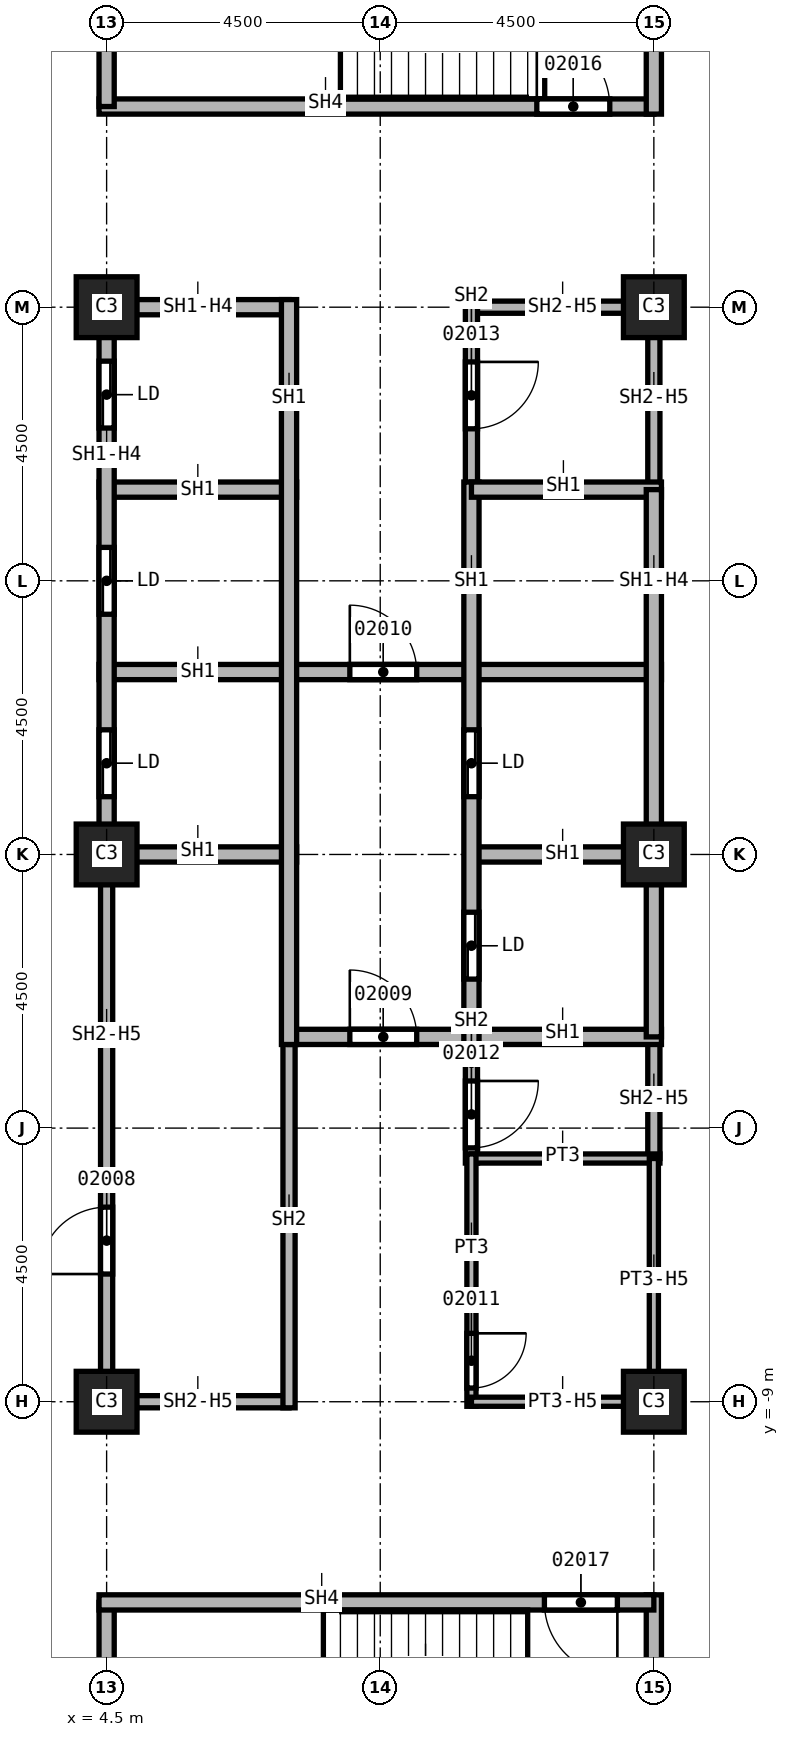
"""IFC4 building model, lengths in metres.
Left out: names, types, materials, properties, quantities, classifications, styles, units other than length and angle.
Written with IfcOpenShell. Run it as: python <this file> out.ifc"""

import sys

from ifc_helpers import new_model, si_unit, direction, frame, frame_2d, origin, origin_2d, place, context, subcontext, project, spatial, rectangle, extrude, element, fill, save


model = new_model("IFC4")
c1 = context("Model", 3, precision=1e-05, world=origin(), true_north=direction((0.0, 1.0)))
c2 = subcontext(c1, "Body", "Model", "MODEL_VIEW")
j1 = project(units=[si_unit("LENGTHUNIT", "METRE"), si_unit("PLANEANGLEUNIT", "RADIAN")], contexts=[c1])
p1 = place(None, origin())
s1 = spatial("IfcSite", under=j1, at=p1, CompositionType="ELEMENT")
p2 = place(p1, origin())
s2 = spatial("IfcBuilding", under=s1, at=p2, CompositionType="ELEMENT")
p3 = place(p2, frame((0.0, 0.0, 80.0)))
s3 = spatial("IfcBuildingStorey", under=s2, at=p3, CompositionType="ELEMENT", Elevation=80.0)
for number, where, z_axis, x_axis in (
    (1, (4.5, 0.0, 0.0), (0.0, 0.0, 1.0), (1.0, 0.0, 0.0)),
    (2, (4.5, 9.0, 0.0), (0.0, 0.0, 1.0), (1.0, 0.0, 0.0)),
    (3, (4.5, -9.0, 0.0), (0.0, 0.0, 1.0), (1.0, 0.0, 0.0)),
    (4, (13.5, 0.0, 0.0), (0.0, 0.0, 1.0), (1.0, 0.0, 0.0)),
    (5, (13.5, 9.0, 0.0), (0.0, 0.0, 1.0), (1.0, 0.0, 0.0)),
    (6, (13.5, -9.0, 0.0), (0.0, 0.0, 1.0), (1.0, 0.0, 0.0)),
):
    element("IfcColumn", number, at=place(p3, frame(where, z_axis=z_axis, x_axis=x_axis)), inside=s3, PredefinedType="COLUMN", context=c2, shape_type="SweptSolid", body=[
        extrude(rectangle(XDim=1.0, YDim=1.0, at=origin_2d()), origin(), (0.0, 0.0, 1.0), 3.7),
    ])
p4 = place(p3, frame((4.5, -9.1, 0.0), z_axis=(0.0, 0.0, 1.0), x_axis=(0.0, 1.0, 0.0)))
e7 = element("IfcWall", 7, at=p4, inside=s3, PredefinedType="SOLIDWALL", context=c2, shape_type="SweptSolid", body=[
    extrude(rectangle(XDim=9.1, YDim=0.2, at=frame_2d((4.55, 0.0))), origin(), (0.0, 0.0, 1.0), 2.938),
])
p5 = place(p4, frame((2.2, 0.0, 0.0)))
e8 = element("IfcOpeningElement", 8, at=p5, cuts=e7, PredefinedType="OPENING", context=c2, shape_type="SweptSolid", body=[
    extrude(rectangle(XDim=1.1, YDim=2.1, at=frame_2d((0.55, 1.05))), frame((0.0, 0.1, 0.0), z_axis=(0.0, -1.0, 0.0), x_axis=(1.0, 0.0, 0.0)), (0.0, 0.0, 1.0), 0.2),
])
p6 = place(p3, frame((7.5, -9.0, 0.0), z_axis=(0.0, 0.0, 1.0), x_axis=(-1.0, 0.0, 0.0)))
e9 = element("IfcWall", 9, at=p6, inside=s3, PredefinedType="SOLIDWALL", context=c2, shape_type="SweptSolid", body=[
    extrude(rectangle(XDim=3.0, YDim=0.2, at=frame_2d((1.5, 0.0))), origin(), (0.0, 0.0, 1.0), 2.938),
])
p7 = place(p3, frame((7.5, -2.875, 0.0), z_axis=(0.0, 0.0, 1.0), x_axis=(0.0, -1.0, 0.0)))
e10 = element("IfcWall", 10, at=p7, inside=s3, PredefinedType="SOLIDWALL", context=c2, shape_type="SweptSolid", body=[
    extrude(rectangle(XDim=6.225, YDim=0.2, at=frame_2d((3.113, 0.0))), origin(), (0.0, 0.0, 1.0), 3.7),
])
p8 = place(p3, frame((10.5, -2.875, 0.0), z_axis=(0.0, 0.0, 1.0), x_axis=(0.0, -1.0, 0.0)))
e11 = element("IfcWall", 11, at=p8, inside=s3, PredefinedType="SOLIDWALL", context=c2, shape_type="SweptSolid", body=[
    extrude(rectangle(XDim=2.2, YDim=0.2, at=frame_2d((1.1, 0.0))), origin(), (0.0, 0.0, 1.0), 3.7),
])
p9 = place(p8, frame((0.85, 0.0, 0.0)))
e12 = element("IfcOpeningElement", 12, at=p9, cuts=e11, PredefinedType="OPENING", context=c2, shape_type="SweptSolid", body=[
    extrude(rectangle(XDim=1.1, YDim=2.1, at=frame_2d((0.55, 1.05))), frame((0.0, 0.1, 0.0), z_axis=(0.0, -1.0, 0.0), x_axis=(1.0, 0.0, 0.0)), (0.0, 0.0, 1.0), 0.2),
])
p10 = place(p3, frame((10.5, 9.0, 0.0), z_axis=(0.0, 0.0, 1.0), x_axis=(1.0, 0.0, 0.0)))
e13 = element("IfcWall", 13, at=p10, inside=s3, PredefinedType="SOLIDWALL", context=c2, shape_type="SweptSolid", body=[
    extrude(rectangle(XDim=3.0, YDim=0.2, at=frame_2d((1.5, 0.0))), origin(), (0.0, 0.0, 1.0), 2.938),
])
p11 = place(p3, frame((10.5, 9.1, 0.0), z_axis=(0.0, 0.0, 1.0), x_axis=(0.0, -1.0, 0.0)))
e14 = element("IfcWall", 14, at=p11, inside=s3, PredefinedType="SOLIDWALL", context=c2, shape_type="SweptSolid", body=[
    extrude(rectangle(XDim=3.225, YDim=0.2, at=frame_2d((1.613, 0.0))), origin(), (0.0, 0.0, 1.0), 3.7),
])
p12 = place(p11, frame((1.0, 0.0, 0.0)))
e15 = element("IfcOpeningElement", 15, at=p12, cuts=e14, PredefinedType="OPENING", context=c2, shape_type="SweptSolid", body=[
    extrude(rectangle(XDim=1.1, YDim=2.1, at=frame_2d((0.55, 1.05))), frame((0.0, 0.1, 0.0), z_axis=(0.0, -1.0, 0.0), x_axis=(1.0, 0.0, 0.0)), (0.0, 0.0, 1.0), 0.2),
])
p13 = place(p3, frame((13.5, -3.0, 0.0), z_axis=(0.0, 0.0, 1.0), x_axis=(0.0, -1.0, 0.0)))
e16 = element("IfcWall", 16, at=p13, inside=s3, PredefinedType="SOLIDWALL", context=c2, shape_type="SweptSolid", body=[
    extrude(rectangle(XDim=2.0, YDim=0.2, at=frame_2d((1.0, 0.0))), origin(), (0.0, 0.0, 1.0), 2.938),
])
p14 = place(p3, frame((13.5, 9.1, 0.0), z_axis=(0.0, 0.0, 1.0), x_axis=(0.0, -1.0, 0.0)))
e17 = element("IfcWall", 17, at=p14, inside=s3, PredefinedType="SOLIDWALL", context=c2, shape_type="SweptSolid", body=[
    extrude(rectangle(XDim=3.1, YDim=0.2, at=frame_2d((1.55, 0.0))), origin(), (0.0, 0.0, 1.0), 2.938),
])
p15 = place(p3, frame((4.375, 0.0, 0.0), z_axis=(0.0, 0.0, 1.0), x_axis=(1.0, 0.0, 0.0)))
e18 = element("IfcWall", 18, at=p15, inside=s3, PredefinedType="SOLIDWALL", context=c2, shape_type="SweptSolid", body=[
    extrude(rectangle(XDim=3.25, YDim=0.25, at=frame_2d((1.625, 0.0))), origin(), (0.0, 0.0, 1.0), 3.7),
])
p16 = place(p3, frame((4.375, 3.0, 0.0), z_axis=(0.0, 0.0, 1.0), x_axis=(1.0, 0.0, 0.0)))
e19 = element("IfcWall", 19, at=p16, inside=s3, PredefinedType="SOLIDWALL", context=c2, shape_type="SweptSolid", body=[
    extrude(rectangle(XDim=9.25, YDim=0.25, at=frame_2d((4.625, 0.0))), origin(), (0.0, 0.0, 1.0), 3.7),
])
p17 = place(p16, frame((4.125, 0.0, 0.0)))
e20 = element("IfcOpeningElement", 20, at=p17, cuts=e19, PredefinedType="OPENING", context=c2, shape_type="SweptSolid", body=[
    extrude(rectangle(XDim=1.1, YDim=2.1, at=frame_2d((0.55, 1.05))), frame((0.0, 0.125, 0.0), z_axis=(0.0, -1.0, 0.0), x_axis=(1.0, 0.0, 0.0)), (0.0, 0.0, 1.0), 0.25),
])
p18 = place(p3, frame((4.375, 6.0, 0.0), z_axis=(0.0, 0.0, 1.0), x_axis=(1.0, 0.0, 0.0)))
e21 = element("IfcWall", 21, at=p18, inside=s3, PredefinedType="SOLIDWALL", context=c2, shape_type="SweptSolid", body=[
    extrude(rectangle(XDim=3.25, YDim=0.25, at=frame_2d((1.625, 0.0))), origin(), (0.0, 0.0, 1.0), 3.7),
])
p19 = place(p3, frame((4.5, 0.0, 0.0), z_axis=(0.0, 0.0, 1.0), x_axis=(0.0, 1.0, 0.0)))
e22 = element("IfcWall", 22, at=p19, inside=s3, PredefinedType="SOLIDWALL", context=c2, shape_type="SweptSolid", body=[
    extrude(rectangle(XDim=9.125, YDim=0.25, at=frame_2d((4.562, 0.0))), origin(), (0.0, 0.0, 1.0), 2.938),
])
p20 = place(p19, frame((0.95, 0.0, 0.0)))
e23 = element("IfcOpeningElement", 23, at=p20, cuts=e22, PredefinedType="OPENING", context=c2, shape_type="SweptSolid", body=[
    extrude(rectangle(XDim=1.1, YDim=2.1, at=frame_2d((0.55, 1.05))), frame((0.0, 0.125, 0.0), z_axis=(0.0, -1.0, 0.0), x_axis=(1.0, 0.0, 0.0)), (0.0, 0.0, 1.0), 0.25),
])
p21 = place(p19, frame((3.95, 0.0, 0.0)))
e24 = element("IfcOpeningElement", 24, at=p21, cuts=e22, PredefinedType="OPENING", context=c2, shape_type="SweptSolid", body=[
    extrude(rectangle(XDim=1.1, YDim=2.1, at=frame_2d((0.55, 1.05))), frame((0.0, 0.125, 0.0), z_axis=(0.0, -1.0, 0.0), x_axis=(1.0, 0.0, 0.0)), (0.0, 0.0, 1.0), 0.25),
])
p22 = place(p19, frame((7.012, 0.0, 0.0)))
e25 = element("IfcOpeningElement", 25, at=p22, cuts=e22, PredefinedType="OPENING", context=c2, shape_type="SweptSolid", body=[
    extrude(rectangle(XDim=1.1, YDim=2.1, at=frame_2d((0.55, 1.05))), frame((0.0, 0.125, 0.0), z_axis=(0.0, -1.0, 0.0), x_axis=(1.0, 0.0, 0.0)), (0.0, 0.0, 1.0), 0.25),
])
p23 = place(p3, frame((4.5, 9.0, 0.0), z_axis=(0.0, 0.0, 1.0), x_axis=(1.0, 0.0, 0.0)))
e26 = element("IfcWall", 26, at=p23, inside=s3, PredefinedType="SOLIDWALL", context=c2, shape_type="SweptSolid", body=[
    extrude(rectangle(XDim=3.0, YDim=0.25, at=frame_2d((1.5, 0.0))), origin(), (0.0, 0.0, 1.0), 2.938),
])
p24 = place(p3, frame((7.5, -3.0, 0.0), z_axis=(0.0, 0.0, 1.0), x_axis=(1.0, 0.0, 0.0)))
e27 = element("IfcWall", 27, at=p24, inside=s3, PredefinedType="SOLIDWALL", context=c2, shape_type="SweptSolid", body=[
    extrude(rectangle(XDim=6.125, YDim=0.25, at=frame_2d((3.062, 0.0))), origin(), (0.0, 0.0, 1.0), 3.7),
])
p25 = place(p24, frame((1.0, 0.0, 0.0)))
e28 = element("IfcOpeningElement", 28, at=p25, cuts=e27, PredefinedType="OPENING", context=c2, shape_type="SweptSolid", body=[
    extrude(rectangle(XDim=1.1, YDim=2.1, at=frame_2d((0.55, 1.05))), frame((0.0, 0.125, 0.0), z_axis=(0.0, -1.0, 0.0), x_axis=(1.0, 0.0, 0.0)), (0.0, 0.0, 1.0), 0.25),
])
p26 = place(p3, frame((7.5, 9.125, 0.0), z_axis=(0.0, 0.0, 1.0), x_axis=(0.0, -1.0, 0.0)))
e29 = element("IfcWall", 29, at=p26, inside=s3, PredefinedType="SOLIDWALL", context=c2, shape_type="SweptSolid", body=[
    extrude(rectangle(XDim=12.25, YDim=0.25, at=frame_2d((6.125, 0.0))), origin(), (0.0, 0.0, 1.0), 3.7),
])
p27 = place(p3, frame((10.5, 0.0, 0.0), z_axis=(0.0, 0.0, 1.0), x_axis=(1.0, 0.0, 0.0)))
e30 = element("IfcWall", 30, at=p27, inside=s3, PredefinedType="SOLIDWALL", context=c2, shape_type="SweptSolid", body=[
    extrude(rectangle(XDim=3.125, YDim=0.25, at=frame_2d((1.562, 0.0))), origin(), (0.0, 0.0, 1.0), 3.7),
])
p28 = place(p3, frame((10.5, 6.125, 0.0), z_axis=(0.0, 0.0, 1.0), x_axis=(0.0, -1.0, 0.0)))
e31 = element("IfcWall", 31, at=p28, inside=s3, PredefinedType="SOLIDWALL", context=c2, shape_type="SweptSolid", body=[
    extrude(rectangle(XDim=9.25, YDim=0.25, at=frame_2d((4.625, 0.0))), origin(), (0.0, 0.0, 1.0), 3.7),
])
p29 = place(p28, frame((7.075, 0.0, 0.0)))
e32 = element("IfcOpeningElement", 32, at=p29, cuts=e31, PredefinedType="OPENING", context=c2, shape_type="SweptSolid", body=[
    extrude(rectangle(XDim=1.1, YDim=2.1, at=frame_2d((0.55, 1.05))), frame((0.0, 0.125, 0.0), z_axis=(0.0, -1.0, 0.0), x_axis=(1.0, 0.0, 0.0)), (0.0, 0.0, 1.0), 0.25),
])
p30 = place(p28, frame((4.075, 0.0, 0.0)))
e33 = element("IfcOpeningElement", 33, at=p30, cuts=e31, PredefinedType="OPENING", context=c2, shape_type="SweptSolid", body=[
    extrude(rectangle(XDim=1.1, YDim=2.1, at=frame_2d((0.55, 1.05))), frame((0.0, 0.125, 0.0), z_axis=(0.0, -1.0, 0.0), x_axis=(1.0, 0.0, 0.0)), (0.0, 0.0, 1.0), 0.25),
])
p31 = place(p3, frame((10.5, 6.0, 0.0), z_axis=(0.0, 0.0, 1.0), x_axis=(1.0, 0.0, 0.0)))
e34 = element("IfcWall", 34, at=p31, inside=s3, PredefinedType="SOLIDWALL", context=c2, shape_type="SweptSolid", body=[
    extrude(rectangle(XDim=3.125, YDim=0.25, at=frame_2d((1.562, 0.0))), origin(), (0.0, 0.0, 1.0), 3.7),
])
p32 = place(p3, frame((13.5, 6.0, 0.0), z_axis=(0.0, 0.0, 1.0), x_axis=(0.0, -1.0, 0.0)))
e35 = element("IfcWall", 35, at=p32, inside=s3, PredefinedType="SOLIDWALL", context=c2, shape_type="SweptSolid", body=[
    extrude(rectangle(XDim=9.0, YDim=0.25, at=frame_2d((4.5, 0.0))), origin(), (0.0, 0.0, 1.0), 2.938),
])
p33 = place(p3, frame((4.375, 12.3, 0.0), z_axis=(0.0, 0.0, 1.0), x_axis=(1.0, 0.0, 0.0)))
e36 = element("IfcWall", 36, at=p33, inside=s3, PredefinedType="SOLIDWALL", context=c2, shape_type="SweptSolid", body=[
    extrude(rectangle(XDim=9.125, YDim=0.25, at=frame_2d((4.562, 0.0))), origin(), (0.0, 0.0, 1.0), 3.7),
])
p34 = place(p33, frame((7.2, 0.0, 0.0)))
e37 = element("IfcOpeningElement", 37, at=p34, cuts=e36, PredefinedType="OPENING", context=c2, shape_type="SweptSolid", body=[
    extrude(rectangle(XDim=1.2, YDim=2.1, at=frame_2d((0.6, 1.05))), frame((0.0, 0.125, 0.0), z_axis=(0.0, -1.0, 0.0), x_axis=(1.0, 0.0, 0.0)), (0.0, 0.0, 1.0), 0.25),
])
for number, where, z_axis, x_axis in (
    (38, (4.5, -16.8, 0.0), (0.0, 0.0, 1.0), (0.0, 1.0, 0.0)),
    (39, (4.5, 12.3, 0.0), (0.0, 0.0, 1.0), (0.0, 1.0, 0.0)),
):
    element("IfcWall", number, at=place(p3, frame(where, z_axis=z_axis, x_axis=x_axis)), inside=s3, PredefinedType="SOLIDWALL", context=c2, shape_type="SweptSolid", body=[
        extrude(rectangle(XDim=4.5, YDim=0.25, at=frame_2d((2.25, 0.0))), origin(), (0.0, 0.0, 1.0), 3.7),
    ])
p35 = place(p3, frame((13.5, -16.925, 0.0), z_axis=(0.0, 0.0, 1.0), x_axis=(0.0, 1.0, 0.0)))
e40 = element("IfcWall", 40, at=p35, inside=s3, PredefinedType="SOLIDWALL", context=c2, shape_type="SweptSolid", body=[
    extrude(rectangle(XDim=4.75, YDim=0.25, at=frame_2d((2.375, 0.0))), origin(), (0.0, 0.0, 1.0), 3.7),
])
p36 = place(p3, frame((13.5, -12.3, 0.0), z_axis=(0.0, 0.0, 1.0), x_axis=(-1.0, 0.0, 0.0)))
e41 = element("IfcWall", 41, at=p36, inside=s3, PredefinedType="SOLIDWALL", context=c2, shape_type="SweptSolid", body=[
    extrude(rectangle(XDim=9.125, YDim=0.25, at=frame_2d((4.562, 0.0))), origin(), (0.0, 0.0, 1.0), 3.7),
])
p37 = place(p36, frame((0.6, 0.0, 0.0)))
e42 = element("IfcOpeningElement", 42, at=p37, cuts=e41, PredefinedType="OPENING", context=c2, shape_type="SweptSolid", body=[
    extrude(rectangle(XDim=1.2, YDim=2.1, at=frame_2d((0.6, 1.05))), frame((0.0, 0.125, 0.0), z_axis=(0.0, -1.0, 0.0), x_axis=(1.0, 0.0, 0.0)), (0.0, 0.0, 1.0), 0.25),
])
p38 = place(p3, frame((13.5, 12.175, 0.0), z_axis=(0.0, 0.0, 1.0), x_axis=(0.0, 1.0, 0.0)))
e43 = element("IfcWall", 43, at=p38, inside=s3, PredefinedType="SOLIDWALL", context=c2, shape_type="SweptSolid", body=[
    extrude(rectangle(XDim=4.75, YDim=0.25, at=frame_2d((2.375, 0.0))), origin(), (0.0, 0.0, 1.0), 3.7),
])
p39 = place(p3, frame((10.5, -5.0, 0.0), z_axis=(0.0, 0.0, 1.0), x_axis=(1.0, 0.0, 0.0)))
e44 = element("IfcWall", 44, at=p39, inside=s3, PredefinedType="PARTITIONING", context=c2, shape_type="SweptSolid", body=[
    extrude(rectangle(XDim=3.1, YDim=0.15, at=frame_2d((1.55, 0.0))), origin(), (0.0, 0.0, 1.0), 3.7),
])
p40 = place(p3, frame((10.5, -4.925, 0.0), z_axis=(0.0, 0.0, 1.0), x_axis=(0.0, -1.0, 0.0)))
e45 = element("IfcWall", 45, at=p40, inside=s3, PredefinedType="PARTITIONING", context=c2, shape_type="SweptSolid", body=[
    extrude(rectangle(XDim=4.15, YDim=0.15, at=frame_2d((2.075, 0.0))), origin(), (0.0, 0.0, 1.0), 3.7),
])
p41 = place(p40, frame((2.95, 0.0, 0.0)))
e46 = element("IfcOpeningElement", 46, at=p41, cuts=e45, PredefinedType="OPENING", context=c2, shape_type="SweptSolid", body=[
    extrude(rectangle(XDim=0.9, YDim=2.1, at=frame_2d((0.45, 1.05))), frame((0.0, 0.075, 0.0), z_axis=(0.0, -1.0, 0.0), x_axis=(1.0, 0.0, 0.0)), (0.0, 0.0, 1.0), 0.15),
])
p42 = place(p3, frame((13.5, -9.0, 0.0), z_axis=(0.0, 0.0, 1.0), x_axis=(-1.0, 0.0, 0.0)))
e47 = element("IfcWall", 47, at=p42, inside=s3, PredefinedType="PARTITIONING", context=c2, shape_type="SweptSolid", body=[
    extrude(rectangle(XDim=3.0, YDim=0.15, at=frame_2d((1.5, 0.0))), origin(), (0.0, 0.0, 1.0), 2.938),
])
p43 = place(p3, frame((13.5, -5.0, 0.0), z_axis=(0.0, 0.0, 1.0), x_axis=(0.0, -1.0, 0.0)))
e48 = element("IfcWall", 48, at=p43, inside=s3, PredefinedType="PARTITIONING", context=c2, shape_type="SweptSolid", body=[
    extrude(rectangle(XDim=4.075, YDim=0.15, at=frame_2d((2.038, 0.0))), origin(), (0.0, 0.0, 1.0), 2.938),
])
p44 = place(p5, origin())
e49 = element("IfcDoor", 49, at=p44, inside=s3, OperationType="SINGLE_SWING_LEFT", PredefinedType="DOOR", context=c2, shape_type="SweptSolid", body=[
    extrude(rectangle(XDim=1.1, YDim=2.1, at=frame_2d((0.55, 1.05))), frame((0.0, 0.025, 0.0), z_axis=(0.0, -1.0, 0.0), x_axis=(1.0, 0.0, 0.0)), (0.0, 0.0, 1.0), 0.05),
])
fill(e8, e49)
p45 = place(p25, origin())
e50 = element("IfcDoor", 50, at=p45, inside=s3, OperationType="SINGLE_SWING_RIGHT", PredefinedType="DOOR", context=c2, shape_type="SweptSolid", body=[
    extrude(rectangle(XDim=1.1, YDim=2.1, at=frame_2d((0.55, 1.05))), frame((0.0, 0.025, 0.0), z_axis=(0.0, -1.0, 0.0), x_axis=(1.0, 0.0, 0.0)), (0.0, 0.0, 1.0), 0.05),
])
fill(e28, e50)
p46 = place(p17, origin())
e51 = element("IfcDoor", 51, at=p46, inside=s3, OperationType="SINGLE_SWING_LEFT", PredefinedType="DOOR", context=c2, shape_type="SweptSolid", body=[
    extrude(rectangle(XDim=1.1, YDim=2.1, at=frame_2d((0.55, 1.05))), frame((0.0, 0.025, 0.0), z_axis=(0.0, -1.0, 0.0), x_axis=(1.0, 0.0, 0.0)), (0.0, 0.0, 1.0), 0.05),
])
fill(e20, e51)
p47 = place(p41, origin())
e52 = element("IfcDoor", 52, at=p47, inside=s3, OperationType="SINGLE_SWING_RIGHT", PredefinedType="DOOR", context=c2, shape_type="SweptSolid", body=[
    extrude(rectangle(XDim=0.9, YDim=2.1, at=frame_2d((0.45, 1.05))), frame((0.0, 0.025, 0.0), z_axis=(0.0, -1.0, 0.0), x_axis=(1.0, 0.0, 0.0)), (0.0, 0.0, 1.0), 0.05),
])
fill(e46, e52)
p48 = place(p9, origin())
e53 = element("IfcDoor", 53, at=p48, inside=s3, OperationType="SINGLE_SWING_LEFT", PredefinedType="DOOR", context=c2, shape_type="SweptSolid", body=[
    extrude(rectangle(XDim=1.1, YDim=2.1, at=frame_2d((0.55, 1.05))), frame((0.0, 0.025, 0.0), z_axis=(0.0, -1.0, 0.0), x_axis=(1.0, 0.0, 0.0)), (0.0, 0.0, 1.0), 0.05),
])
fill(e12, e53)
p49 = place(p12, origin())
e54 = element("IfcDoor", 54, at=p49, inside=s3, OperationType="SINGLE_SWING_RIGHT", PredefinedType="DOOR", context=c2, shape_type="SweptSolid", body=[
    extrude(rectangle(XDim=1.1, YDim=2.1, at=frame_2d((0.55, 1.05))), frame((0.0, 0.025, 0.0), z_axis=(0.0, -1.0, 0.0), x_axis=(1.0, 0.0, 0.0)), (0.0, 0.0, 1.0), 0.05),
])
fill(e15, e54)
p50 = place(p34, origin())
e55 = element("IfcDoor", 55, at=p50, inside=s3, OperationType="SINGLE_SWING_LEFT", PredefinedType="DOOR", context=c2, shape_type="SweptSolid", body=[
    extrude(rectangle(XDim=1.2, YDim=2.1, at=frame_2d((0.6, 1.05))), frame((0.0, 0.025, 0.0), z_axis=(0.0, -1.0, 0.0), x_axis=(1.0, 0.0, 0.0)), (0.0, 0.0, 1.0), 0.05),
])
fill(e37, e55)
p51 = place(p37, origin())
e56 = element("IfcDoor", 56, at=p51, inside=s3, OperationType="SINGLE_SWING_RIGHT", PredefinedType="DOOR", context=c2, shape_type="SweptSolid", body=[
    extrude(rectangle(XDim=1.2, YDim=2.1, at=frame_2d((0.6, 1.05))), frame((0.0, 0.025, 0.0), z_axis=(0.0, -1.0, 0.0), x_axis=(1.0, 0.0, 0.0)), (0.0, 0.0, 1.0), 0.05),
])
fill(e42, e56)
p52 = place(p20, origin())
e57 = element("IfcDoor", 57, at=p52, inside=s3, OperationType="SLIDING_TO_LEFT", PredefinedType="DOOR", context=c2, shape_type="SweptSolid", body=[
    extrude(rectangle(XDim=1.1, YDim=2.1, at=frame_2d((0.55, 1.05))), frame((0.0, 0.025, 0.0), z_axis=(0.0, -1.0, 0.0), x_axis=(1.0, 0.0, 0.0)), (0.0, 0.0, 1.0), 0.05),
])
fill(e23, e57)
p53 = place(p21, origin())
e58 = element("IfcDoor", 58, at=p53, inside=s3, OperationType="SLIDING_TO_LEFT", PredefinedType="DOOR", context=c2, shape_type="SweptSolid", body=[
    extrude(rectangle(XDim=1.1, YDim=2.1, at=frame_2d((0.55, 1.05))), frame((0.0, 0.025, 0.0), z_axis=(0.0, -1.0, 0.0), x_axis=(1.0, 0.0, 0.0)), (0.0, 0.0, 1.0), 0.05),
])
fill(e24, e58)
p54 = place(p22, origin())
e59 = element("IfcDoor", 59, at=p54, inside=s3, OperationType="SLIDING_TO_LEFT", PredefinedType="DOOR", context=c2, shape_type="SweptSolid", body=[
    extrude(rectangle(XDim=1.1, YDim=2.1, at=frame_2d((0.55, 1.05))), frame((0.0, 0.025, 0.0), z_axis=(0.0, -1.0, 0.0), x_axis=(1.0, 0.0, 0.0)), (0.0, 0.0, 1.0), 0.05),
])
fill(e25, e59)
p55 = place(p29, origin())
e60 = element("IfcDoor", 60, at=p55, inside=s3, OperationType="SLIDING_TO_LEFT", PredefinedType="DOOR", context=c2, shape_type="SweptSolid", body=[
    extrude(rectangle(XDim=1.1, YDim=2.1, at=frame_2d((0.55, 1.05))), frame((0.0, 0.025, 0.0), z_axis=(0.0, -1.0, 0.0), x_axis=(1.0, 0.0, 0.0)), (0.0, 0.0, 1.0), 0.05),
])
fill(e32, e60)
p56 = place(p30, origin())
e61 = element("IfcDoor", 61, at=p56, inside=s3, OperationType="SLIDING_TO_LEFT", PredefinedType="DOOR", context=c2, shape_type="SweptSolid", body=[
    extrude(rectangle(XDim=1.1, YDim=2.1, at=frame_2d((0.55, 1.05))), frame((0.0, 0.025, 0.0), z_axis=(0.0, -1.0, 0.0), x_axis=(1.0, 0.0, 0.0)), (0.0, 0.0, 1.0), 0.05),
])
fill(e33, e61)
save(model, sys.argv[1])
